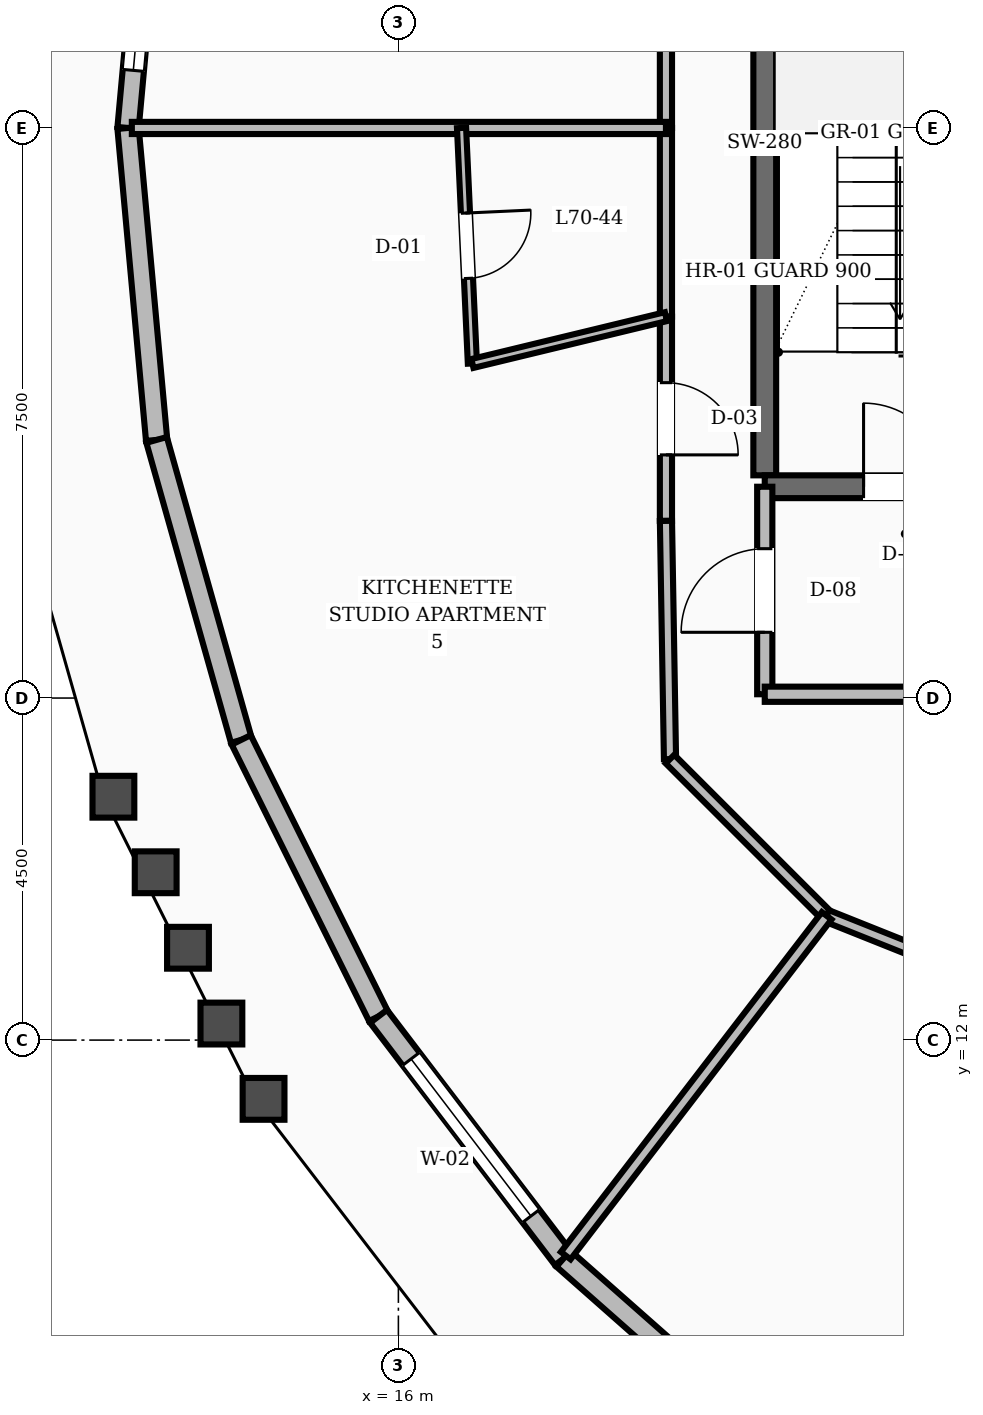
"""IFC4 building model, lengths in metres.
Left out: names, types, materials, properties, quantities, classifications, styles, units other than length and angle.
Written with IfcOpenShell. Run it as: python <this file> out.ifc"""

import sys

from ifc_helpers import new_model, si_unit, direction, frame, frame_2d, origin, place, context, subcontext, project, spatial, rectangle, extrude, element, fill, save


model = new_model("IFC4")
c1 = context("Model", 3, precision=1e-05, world=origin(), true_north=direction((0.0, 1.0)))
c2 = subcontext(c1, "Body", "Model", "MODEL_VIEW")
j1 = project(units=[si_unit("LENGTHUNIT", "METRE"), si_unit("PLANEANGLEUNIT", "RADIAN")], contexts=[c1])
p1 = place(None, origin())
s1 = spatial("IfcSite", under=j1, at=p1, CompositionType="ELEMENT")
p2 = place(p1, origin())
s2 = spatial("IfcBuilding", under=s1, at=p2, CompositionType="ELEMENT")
p3 = place(p2, frame((0.0, 0.0, 268.8)))
s3 = spatial("IfcBuildingStorey", under=s2, at=p3, CompositionType="ELEMENT", Elevation=268.8)
p4 = place(p3, frame((20.82, 19.43, 0.0), z_axis=(0.0, 0.0, 1.0), x_axis=(0.0, 1.0, 0.0)))
e1 = element("IfcWall", 1, at=p4, inside=s3, PredefinedType="SHEAR", context=c2, shape_type="SweptSolid", body=[
    extrude(rectangle(XDim=8.74, YDim=0.3, at=frame_2d((4.37, 0.0))), origin(), (0.0, 0.0, 1.0), 3.6),
])
p5 = place(p3, frame((20.82, 19.28, 0.0), z_axis=(0.0, 0.0, 1.0), x_axis=(1.0, 0.0, 0.0)))
e2 = element("IfcWall", 2, at=p5, inside=s3, PredefinedType="SHEAR", context=c2, shape_type="SweptSolid", body=[
    extrude(rectangle(XDim=3.6, YDim=0.3, at=frame_2d((1.8, 0.0))), origin(), (0.0, 0.0, 1.0), 3.6),
])
p6 = place(p5, frame((1.3, 0.0, 0.0)))
e3 = element("IfcOpeningElement", 3, at=p6, cuts=e2, PredefinedType="OPENING", context=c2, shape_type="SweptSolid", body=[
    extrude(rectangle(XDim=1.1, YDim=2.1, at=frame_2d((0.55, 1.05))), frame((0.0, 0.16, 0.0), z_axis=(0.0, -1.0, 0.0), x_axis=(1.0, 0.0, 0.0)), (0.0, 0.0, 1.0), 0.32),
])
p7 = place(p3, frame((12.819, 28.104, 0.0), z_axis=(0.0, 0.0, 1.0), x_axis=(-0.091230098321, -0.995829839461, 0.0)))
e4 = element("IfcWall", 4, at=p7, inside=s3, PredefinedType="STANDARD", context=c2, shape_type="SweptSolid", body=[
    extrude(rectangle(XDim=4.121, YDim=0.28, at=frame_2d((2.061, 0.0))), origin(), (0.0, 0.0, 1.0), 2.88),
])
p8 = place(p7, frame((0.76, 0.0, 0.8)))
e5 = element("IfcOpeningElement", 5, at=p8, cuts=e4, PredefinedType="OPENING", context=c2, shape_type="SweptSolid", body=[
    extrude(rectangle(XDim=2.6, YDim=1.65, at=frame_2d((1.3, 0.825))), frame((0.0, 0.15, 0.0), z_axis=(0.0, -1.0, 0.0), x_axis=(1.0, 0.0, 0.0)), (0.0, 0.0, 1.0), 0.3),
])
p9 = place(p3, frame((12.443, 24.0, 0.0), z_axis=(0.0, 0.0, 1.0), x_axis=(0.091230098321, -0.995829839461, 0.0)))
e6 = element("IfcWall", 6, at=p9, inside=s3, PredefinedType="STANDARD", context=c2, shape_type="SweptSolid", body=[
    extrude(rectangle(XDim=4.121, YDim=0.28, at=frame_2d((2.061, 0.0))), origin(), (0.0, 0.0, 1.0), 2.88),
])
p10 = place(p3, frame((12.819, 19.896, 0.0), z_axis=(0.0, 0.0, 1.0), x_axis=(0.271385212896, -0.962470813179, 0.0)))
e7 = element("IfcWall", 7, at=p10, inside=s3, PredefinedType="STANDARD", context=c2, shape_type="SweptSolid", body=[
    extrude(rectangle(XDim=4.1, YDim=0.28, at=frame_2d((2.05, 0.0))), origin(), (0.0, 0.0, 1.0), 2.88),
])
p11 = place(p3, frame((13.932, 15.949, 0.0), z_axis=(0.0, 0.0, 1.0), x_axis=(0.444975896213, -0.895542546052, 0.0)))
e8 = element("IfcWall", 8, at=p11, inside=s3, PredefinedType="STANDARD", context=c2, shape_type="SweptSolid", body=[
    extrude(rectangle(XDim=4.061, YDim=0.28, at=frame_2d((2.031, 0.0))), origin(), (0.0, 0.0, 1.0), 2.88),
])
p12 = place(p3, frame((15.739, 12.312, 0.0), z_axis=(0.0, 0.0, 1.0), x_axis=(0.606584214855, -0.795019238942, 0.0)))
e9 = element("IfcWall", 9, at=p12, inside=s3, PredefinedType="STANDARD", context=c2, shape_type="SweptSolid", body=[
    extrude(rectangle(XDim=4.01, YDim=0.28, at=frame_2d((2.005, 0.0))), origin(), (0.0, 0.0, 1.0), 2.88),
])
p13 = place(p12, frame((0.705, 0.0, 0.8)))
e10 = element("IfcOpeningElement", 10, at=p13, cuts=e9, PredefinedType="OPENING", context=c2, shape_type="SweptSolid", body=[
    extrude(rectangle(XDim=2.6, YDim=1.65, at=frame_2d((1.3, 0.825))), frame((0.0, 0.15, 0.0), z_axis=(0.0, -1.0, 0.0), x_axis=(1.0, 0.0, 0.0)), (0.0, 0.0, 1.0), 0.3),
])
p14 = place(p3, frame((18.171, 9.125, 0.0), z_axis=(0.0, 0.0, 1.0), x_axis=(0.749653985562, -0.661829964515, 0.0)))
e11 = element("IfcWall", 11, at=p14, inside=s3, PredefinedType="STANDARD", context=c2, shape_type="SweptSolid", body=[
    extrude(rectangle(XDim=3.953, YDim=0.28, at=frame_2d((1.977, 0.0))), origin(), (0.0, 0.0, 1.0), 2.88),
])
p15 = place(p3, frame((20.82, 16.55, 0.0), z_axis=(0.0, 0.0, 1.0), x_axis=(0.0, 1.0, 0.0)))
e12 = element("IfcWall", 12, at=p15, inside=s3, PredefinedType="SOLIDWALL", context=c2, shape_type="SweptSolid", body=[
    extrude(rectangle(XDim=2.73, YDim=0.2, at=frame_2d((1.365, 0.0))), origin(), (0.0, 0.0, 1.0), 2.87),
])
p16 = place(p15, frame((0.815, 0.0, 0.0)))
e13 = element("IfcOpeningElement", 13, at=p16, cuts=e12, PredefinedType="OPENING", context=c2, shape_type="SweptSolid", body=[
    extrude(rectangle(XDim=1.1, YDim=2.1, at=frame_2d((0.55, 1.05))), frame((0.0, 0.11, 0.0), z_axis=(0.0, -1.0, 0.0), x_axis=(1.0, 0.0, 0.0)), (0.0, 0.0, 1.0), 0.22),
])
p17 = place(p3, frame((20.82, 16.55, 0.0), z_axis=(0.0, 0.0, 1.0), x_axis=(1.0, 0.0, 0.0)))
e14 = element("IfcWall", 14, at=p17, inside=s3, PredefinedType="SOLIDWALL", context=c2, shape_type="SweptSolid", body=[
    extrude(rectangle(XDim=3.98, YDim=0.2, at=frame_2d((1.99, 0.0))), origin(), (0.0, 0.0, 1.0), 2.87),
])
for number, where, z_axis, x_axis in (
    (15, (19.52, 26.482, 0.0), (0.0, 0.0, 1.0), (0.0, -1.0, 0.0)),
    (16, (19.52, 24.0, 0.0), (0.0, 0.0, 1.0), (0.0, -1.0, 0.0)),
):
    element("IfcWall", number, at=place(p3, frame(where, z_axis=z_axis, x_axis=x_axis)), inside=s3, PredefinedType="SOLIDWALL", context=c2, shape_type="SweptSolid", body=[
        extrude(rectangle(XDim=2.482, YDim=0.16, at=frame_2d((1.241, 0.0))), origin(), (0.0, 0.0, 1.0), 2.87),
    ])
p18 = place(p3, frame((19.52, 21.518, 0.0), z_axis=(0.0, 0.0, 1.0), x_axis=(0.0, -1.0, 0.0)))
e17 = element("IfcWall", 17, at=p18, inside=s3, PredefinedType="SOLIDWALL", context=c2, shape_type="SweptSolid", body=[
    extrude(rectangle(XDim=2.687, YDim=0.16, at=frame_2d((1.344, 0.0))), origin(), (0.0, 0.0, 1.0), 2.87),
])
p19 = place(p18, frame((0.868, 0.0, 0.0)))
e18 = element("IfcOpeningElement", 18, at=p19, cuts=e17, PredefinedType="OPENING", context=c2, shape_type="SweptSolid", body=[
    extrude(rectangle(XDim=0.95, YDim=2.1, at=frame_2d((0.475, 1.05))), frame((0.0, 0.09, 0.0), z_axis=(0.0, -1.0, 0.0), x_axis=(1.0, 0.0, 0.0)), (0.0, 0.0, 1.0), 0.18),
])
p20 = place(p3, frame((19.52, 18.831, 0.0), z_axis=(0.0, 0.0, 1.0), x_axis=(0.016981035134, -0.999855811828, 0.0)))
e19 = element("IfcWall", 19, at=p20, inside=s3, PredefinedType="SOLIDWALL", context=c2, shape_type="SweptSolid", body=[
    extrude(rectangle(XDim=3.134, YDim=0.16, at=frame_2d((1.567, 0.0))), origin(), (0.0, 0.0, 1.0), 2.87),
])
p21 = place(p3, frame((19.573, 15.697, 0.0), z_axis=(0.0, 0.0, 1.0), x_axis=(0.707106781187, -0.707106781187, 0.0)))
e20 = element("IfcWall", 20, at=p21, inside=s3, PredefinedType="SOLIDWALL", context=c2, shape_type="SweptSolid", body=[
    extrude(rectangle(XDim=2.916, YDim=0.16, at=frame_2d((1.458, 0.0))), origin(), (0.0, 0.0, 1.0), 2.87),
])
p22 = place(p3, frame((21.635, 13.635, 0.0), z_axis=(0.0, 0.0, 1.0), x_axis=(0.92856882165, -0.371160266542, 0.0)))
e21 = element("IfcWall", 21, at=p22, inside=s3, PredefinedType="SOLIDWALL", context=c2, shape_type="SweptSolid", body=[
    extrude(rectangle(XDim=2.923, YDim=0.16, at=frame_2d((1.461, 0.0))), origin(), (0.0, 0.0, 1.0), 2.87),
])
p23 = place(p3, frame((19.52, 24.0, 0.0), z_axis=(0.0, 0.0, 1.0), x_axis=(-1.0, 0.0, 0.0)))
e22 = element("IfcWall", 22, at=p23, inside=s3, PredefinedType="SOLIDWALL", context=c2, shape_type="SweptSolid", body=[
    extrude(rectangle(XDim=7.027, YDim=0.16, at=frame_2d((3.513, 0.0))), origin(), (0.0, 0.0, 1.0), 2.87),
])
p24 = place(p3, frame((16.831, 24.0, 0.0), z_axis=(0.0, 0.0, 1.0), x_axis=(0.046043143671, -0.99893945208, 0.0)))
e23 = element("IfcWall", 23, at=p24, inside=s3, PredefinedType="PARTITIONING", context=c2, shape_type="SweptSolid", body=[
    extrude(rectangle(XDim=3.102, YDim=0.12, at=frame_2d((1.551, 0.0))), origin(), (0.0, 0.0, 1.0), 2.87),
])
p25 = place(p24, frame((1.121, 0.0, 0.0)))
e24 = element("IfcOpeningElement", 24, at=p25, cuts=e23, PredefinedType="OPENING", context=c2, shape_type="SweptSolid", body=[
    extrude(rectangle(XDim=0.86, YDim=2.1, at=frame_2d((0.43, 1.05))), frame((0.0, 0.07, 0.0), z_axis=(0.0, -1.0, 0.0), x_axis=(1.0, 0.0, 0.0)), (0.0, 0.0, 1.0), 0.14),
])
p26 = place(p3, frame((19.52, 21.518, 0.0), z_axis=(0.0, 0.0, 1.0), x_axis=(-0.971945718509, -0.235205272629, 0.0)))
e25 = element("IfcWall", 25, at=p26, inside=s3, PredefinedType="PARTITIONING", context=c2, shape_type="SweptSolid", body=[
    extrude(rectangle(XDim=2.62, YDim=0.12, at=frame_2d((1.31, 0.0))), origin(), (0.0, 0.0, 1.0), 2.87),
])
p27 = place(p3, frame((21.635, 13.635, 0.0), z_axis=(0.0, 0.0, 1.0), x_axis=(-0.609053303756, -0.793129291593, 0.0)))
e26 = element("IfcWall", 26, at=p27, inside=s3, PredefinedType="SOLIDWALL", context=c2, shape_type="SweptSolid", body=[
    extrude(rectangle(XDim=5.637, YDim=0.16, at=frame_2d((2.818, 0.0))), origin(), (0.0, 0.0, 1.0), 2.87),
])
p28 = place(p8, origin())
e27 = element("IfcWindow", 27, at=p28, inside=s3, PartitioningType="SINGLE_PANEL", PredefinedType="WINDOW", context=c2, shape_type="SweptSolid", body=[
    extrude(rectangle(XDim=2.6, YDim=1.65, at=frame_2d((1.3, 0.825))), frame((0.0, 0.03, 0.0), z_axis=(0.0, -1.0, 0.0), x_axis=(1.0, 0.0, 0.0)), (0.0, 0.0, 1.0), 0.06),
])
fill(e5, e27)
p29 = place(p13, origin())
e28 = element("IfcWindow", 28, at=p29, inside=s3, PartitioningType="SINGLE_PANEL", PredefinedType="WINDOW", context=c2, shape_type="SweptSolid", body=[
    extrude(rectangle(XDim=2.6, YDim=1.65, at=frame_2d((1.3, 0.825))), frame((0.0, 0.03, 0.0), z_axis=(0.0, -1.0, 0.0), x_axis=(1.0, 0.0, 0.0)), (0.0, 0.0, 1.0), 0.06),
])
fill(e10, e28)
p30 = place(p6, origin())
e29 = element("IfcDoor", 29, at=p30, inside=s3, OperationType="SINGLE_SWING_LEFT", PredefinedType="DOOR", context=c2, shape_type="SweptSolid", body=[
    extrude(rectangle(XDim=1.1, YDim=2.1, at=frame_2d((0.55, 1.05))), frame((0.0, 0.025, 0.0), z_axis=(0.0, -1.0, 0.0), x_axis=(1.0, 0.0, 0.0)), (0.0, 0.0, 1.0), 0.05),
])
fill(e3, e29)
p31 = place(p16, origin())
e30 = element("IfcDoor", 30, at=p31, inside=s3, OperationType="SINGLE_SWING_LEFT", PredefinedType="DOOR", context=c2, shape_type="SweptSolid", body=[
    extrude(rectangle(XDim=1.1, YDim=2.1, at=frame_2d((0.55, 1.05))), frame((0.0, 0.025, 0.0), z_axis=(0.0, -1.0, 0.0), x_axis=(1.0, 0.0, 0.0)), (0.0, 0.0, 1.0), 0.05),
])
fill(e13, e30)
p32 = place(p25, origin())
e31 = element("IfcDoor", 31, at=p32, inside=s3, OperationType="SINGLE_SWING_LEFT", PredefinedType="DOOR", context=c2, shape_type="SweptSolid", body=[
    extrude(rectangle(XDim=0.86, YDim=2.1, at=frame_2d((0.43, 1.05))), frame((0.0, 0.025, 0.0), z_axis=(0.0, -1.0, 0.0), x_axis=(1.0, 0.0, 0.0)), (0.0, 0.0, 1.0), 0.05),
])
fill(e24, e31)
p33 = place(p19, origin())
e32 = element("IfcDoor", 32, at=p33, inside=s3, OperationType="SINGLE_SWING_RIGHT", PredefinedType="DOOR", context=c2, shape_type="SweptSolid", body=[
    extrude(rectangle(XDim=0.95, YDim=2.1, at=frame_2d((0.475, 1.05))), frame((0.0, 0.025, 0.0), z_axis=(0.0, -1.0, 0.0), x_axis=(1.0, 0.0, 0.0)), (0.0, 0.0, 1.0), 0.05),
])
fill(e18, e32)
save(model, sys.argv[1])
